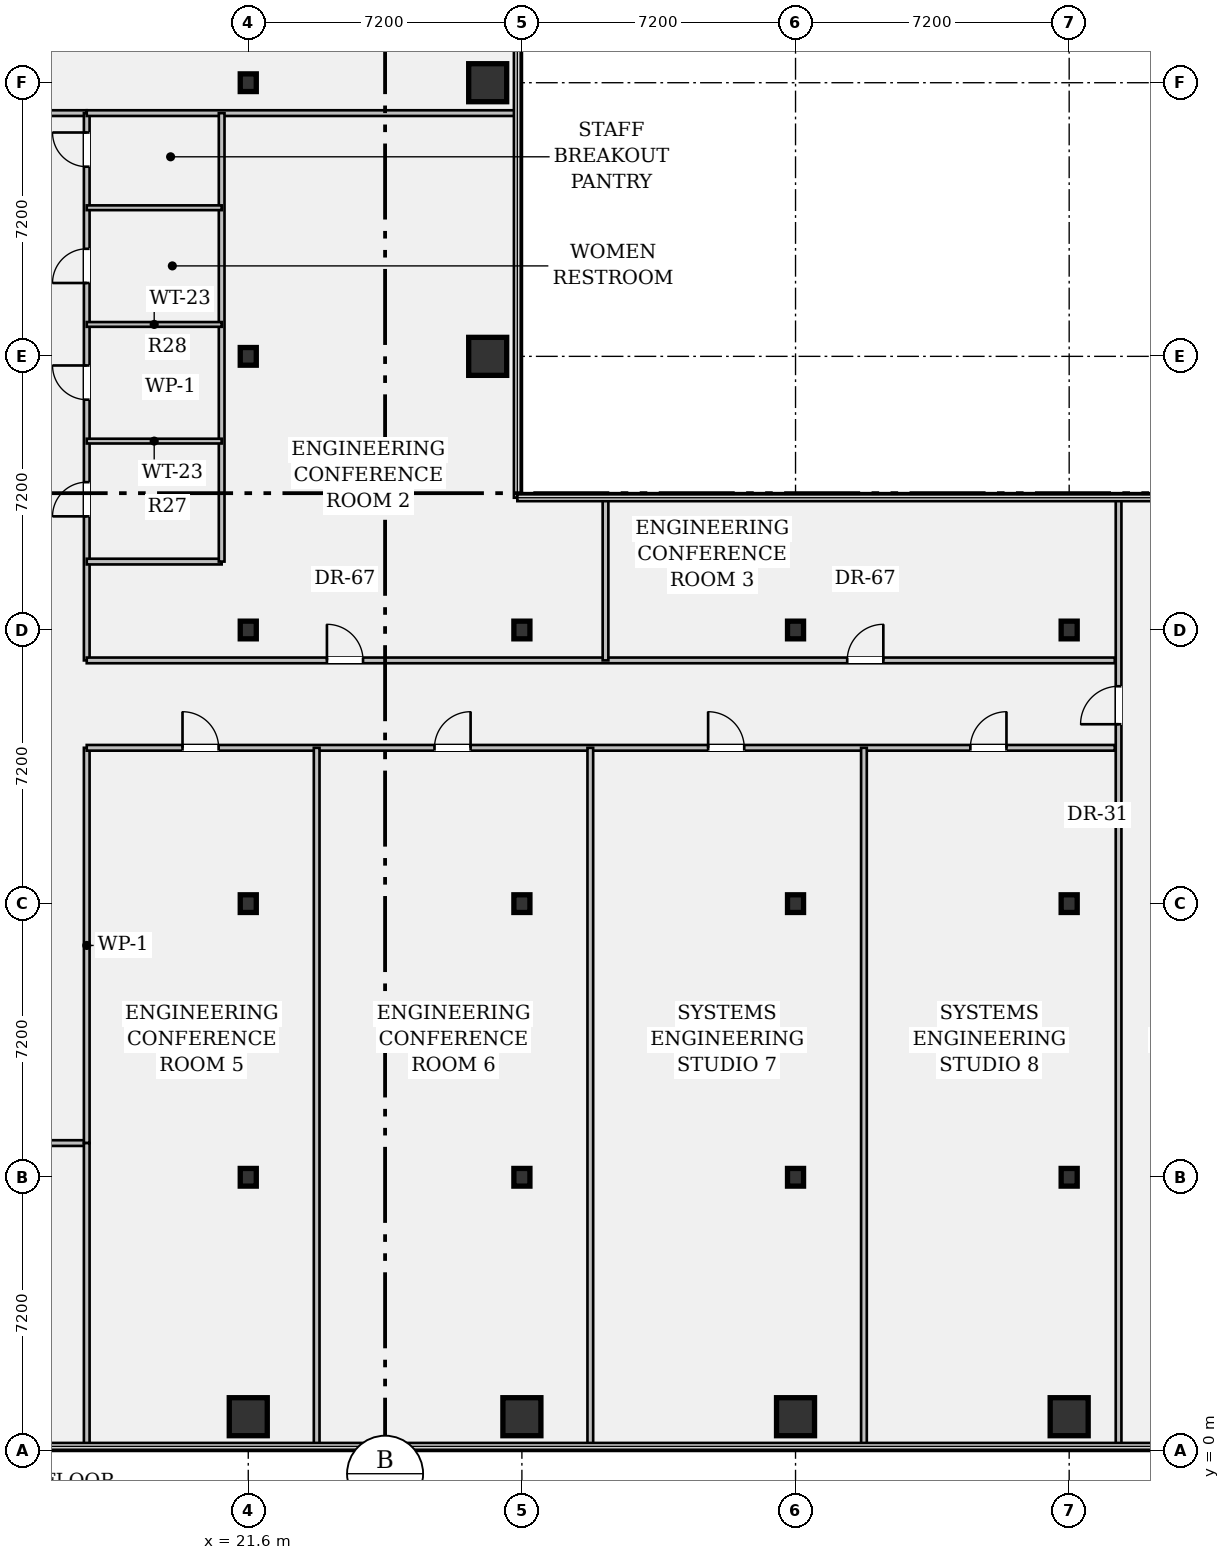
"""IFC4 building model, lengths in metres.
Left out: names, types, materials, properties, quantities, classifications, styles, units other than length and angle.
Written with IfcOpenShell. Run it as: python <this file> out.ifc"""

import sys

from ifc_helpers import new_model, si_unit, direction, frame, frame_2d, origin, origin_2d, place, context, subcontext, project, spatial, rectangle, hollow_rectangle, i_section, extrude, element, fill, save


model = new_model("IFC4")
c1 = context("Model", 3, precision=1e-05, world=origin(), true_north=direction((0.0, 1.0)))
c2 = subcontext(c1, "Body", "Model", "MODEL_VIEW")
j1 = project(units=[si_unit("LENGTHUNIT", "METRE"), si_unit("PLANEANGLEUNIT", "RADIAN")], contexts=[c1])
p1 = place(None, origin())
s1 = spatial("IfcSite", under=j1, at=p1, CompositionType="ELEMENT")
p2 = place(p1, origin())
s2 = spatial("IfcBuilding", under=s1, at=p2, CompositionType="ELEMENT")
p3 = place(p2, frame((0.0, 0.0, 50.4)))
s3 = spatial("IfcBuildingStorey", under=s2, at=p3, CompositionType="ELEMENT", Elevation=50.4)
p4 = place(p3, frame((21.6, 0.9, 0.0), z_axis=(0.0, 0.0, 1.0), x_axis=(1.0, 0.0, 0.0)))
e1 = element("IfcColumn", 1, at=p4, inside=s3, PredefinedType="COLUMN", context=c2, shape_type="SweptSolid", body=[
    extrude(hollow_rectangle(XDim=1.0, YDim=1.0, WallThickness=0.065, at=origin_2d()), origin(), (0.0, 0.0, 1.0), 3.57),
])
for number, where, z_axis, x_axis in (
    (2, (21.6, 7.2, 0.0), (0.0, 0.0, 1.0), (1.0, 0.0, 0.0)),
    (3, (21.6, 14.4, 0.0), (0.0, 0.0, 1.0), (1.0, 0.0, 0.0)),
    (4, (21.6, 21.6, 0.0), (0.0, 0.0, 1.0), (1.0, 0.0, 0.0)),
    (5, (21.6, 28.8, 0.0), (0.0, 0.0, 1.0), (1.0, 0.0, 0.0)),
    (6, (21.6, 36.0, 0.0), (0.0, 0.0, 1.0), (1.0, 0.0, 0.0)),
):
    element("IfcColumn", number, at=place(p3, frame(where, z_axis=z_axis, x_axis=x_axis)), inside=s3, PredefinedType="COLUMN", context=c2, shape_type="SweptSolid", body=[
        extrude(i_section(OverallWidth=0.422, OverallDepth=0.465, WebThickness=0.045, FlangeThickness=0.073, FilletRadius=0.018, at=origin_2d()), origin(), (0.0, 0.0, 1.0), 3.57),
    ])
for number, where, z_axis, x_axis in (
    (7, (27.9, 28.8, 0.0), (0.0, 0.0, 1.0), (1.0, 0.0, 0.0)),
    (8, (27.9, 36.0, 0.0), (0.0, 0.0, 1.0), (1.0, 0.0, 0.0)),
    (9, (28.8, 0.9, 0.0), (0.0, 0.0, 1.0), (1.0, 0.0, 0.0)),
):
    element("IfcColumn", number, at=place(p3, frame(where, z_axis=z_axis, x_axis=x_axis)), inside=s3, PredefinedType="COLUMN", context=c2, shape_type="SweptSolid", body=[
        extrude(hollow_rectangle(XDim=1.0, YDim=1.0, WallThickness=0.065, at=origin_2d()), origin(), (0.0, 0.0, 1.0), 3.57),
    ])
for number, where, z_axis, x_axis in (
    (10, (28.8, 7.2, 0.0), (0.0, 0.0, 1.0), (1.0, 0.0, 0.0)),
    (11, (28.8, 14.4, 0.0), (0.0, 0.0, 1.0), (1.0, 0.0, 0.0)),
    (12, (28.8, 21.6, 0.0), (0.0, 0.0, 1.0), (1.0, 0.0, 0.0)),
):
    element("IfcColumn", number, at=place(p3, frame(where, z_axis=z_axis, x_axis=x_axis)), inside=s3, PredefinedType="COLUMN", context=c2, shape_type="SweptSolid", body=[
        extrude(i_section(OverallWidth=0.422, OverallDepth=0.465, WebThickness=0.045, FlangeThickness=0.073, FilletRadius=0.018, at=origin_2d()), origin(), (0.0, 0.0, 1.0), 3.57),
    ])
p5 = place(p3, frame((36.0, 0.9, 0.0), z_axis=(0.0, 0.0, 1.0), x_axis=(1.0, 0.0, 0.0)))
e13 = element("IfcColumn", 13, at=p5, inside=s3, PredefinedType="COLUMN", context=c2, shape_type="SweptSolid", body=[
    extrude(hollow_rectangle(XDim=1.0, YDim=1.0, WallThickness=0.065, at=origin_2d()), origin(), (0.0, 0.0, 1.0), 3.57),
])
for number, where, z_axis, x_axis in (
    (14, (36.0, 7.2, 0.0), (0.0, 0.0, 1.0), (1.0, 0.0, 0.0)),
    (15, (36.0, 14.4, 0.0), (0.0, 0.0, 1.0), (1.0, 0.0, 0.0)),
    (16, (36.0, 21.6, 0.0), (0.0, 0.0, 1.0), (1.0, 0.0, 0.0)),
):
    element("IfcColumn", number, at=place(p3, frame(where, z_axis=z_axis, x_axis=x_axis)), inside=s3, PredefinedType="COLUMN", context=c2, shape_type="SweptSolid", body=[
        extrude(i_section(OverallWidth=0.422, OverallDepth=0.465, WebThickness=0.045, FlangeThickness=0.073, FilletRadius=0.018, at=origin_2d()), origin(), (0.0, 0.0, 1.0), 3.57),
    ])
p6 = place(p3, frame((43.2, 0.9, 0.0), z_axis=(0.0, 0.0, 1.0), x_axis=(1.0, 0.0, 0.0)))
e17 = element("IfcColumn", 17, at=p6, inside=s3, PredefinedType="COLUMN", context=c2, shape_type="SweptSolid", body=[
    extrude(hollow_rectangle(XDim=1.0, YDim=1.0, WallThickness=0.065, at=origin_2d()), origin(), (0.0, 0.0, 1.0), 3.57),
])
for number, where, z_axis, x_axis in (
    (18, (43.2, 7.2, 0.0), (0.0, 0.0, 1.0), (1.0, 0.0, 0.0)),
    (19, (43.2, 14.4, 0.0), (0.0, 0.0, 1.0), (1.0, 0.0, 0.0)),
    (20, (43.2, 21.6, 0.0), (0.0, 0.0, 1.0), (1.0, 0.0, 0.0)),
):
    element("IfcColumn", number, at=place(p3, frame(where, z_axis=z_axis, x_axis=x_axis)), inside=s3, PredefinedType="COLUMN", context=c2, shape_type="SweptSolid", body=[
        extrude(i_section(OverallWidth=0.422, OverallDepth=0.465, WebThickness=0.045, FlangeThickness=0.073, FilletRadius=0.018, at=origin_2d()), origin(), (0.0, 0.0, 1.0), 3.57),
    ])
p7 = place(p3, frame((14.4, 8.1, 0.0), z_axis=(0.0, 0.0, 1.0), x_axis=(1.0, 0.0, 0.0)))
e21 = element("IfcWall", 21, at=p7, inside=s3, PredefinedType="PARTITIONING", context=c2, shape_type="SweptSolid", body=[
    extrude(rectangle(XDim=2.95, YDim=0.15, at=frame_2d((1.475, 0.0))), origin(), (0.0, 0.0, 1.0), 3.088),
])
p8 = place(p7, frame((0.95, 0.0, 0.0)))
e22 = element("IfcOpeningElement", 22, at=p8, cuts=e21, PredefinedType="OPENING", context=c2, shape_type="SweptSolid", body=[
    extrude(rectangle(XDim=0.95, YDim=2.15, at=frame_2d((0.475, 1.075))), frame((0.0, 0.087, 0.0), z_axis=(0.0, -1.0, 0.0), x_axis=(1.0, 0.0, 0.0)), (0.0, 0.0, 1.0), 0.174),
])
p9 = place(p3, frame((14.4, 35.2, 0.0), z_axis=(0.0, 0.0, 1.0), x_axis=(1.0, 0.0, 0.0)))
e23 = element("IfcWall", 23, at=p9, inside=s3, PredefinedType="PARTITIONING", context=c2, shape_type="SweptSolid", body=[
    extrude(rectangle(XDim=2.95, YDim=0.15, at=frame_2d((1.475, 0.0))), origin(), (0.0, 0.0, 1.0), 3.088),
])
p10 = place(p9, frame((0.95, 0.0, 0.0)))
e24 = element("IfcOpeningElement", 24, at=p10, cuts=e23, PredefinedType="OPENING", context=c2, shape_type="SweptSolid", body=[
    extrude(rectangle(XDim=1.0, YDim=2.15, at=frame_2d((0.5, 1.075))), frame((0.0, 0.087, 0.0), z_axis=(0.0, -1.0, 0.0), x_axis=(1.0, 0.0, 0.0)), (0.0, 0.0, 1.0), 0.174),
])
p11 = place(p3, frame((17.35, 8.1, 0.0), z_axis=(0.0, 0.0, 1.0), x_axis=(0.0, 1.0, 0.0)))
e25 = element("IfcWall", 25, at=p11, inside=s3, PredefinedType="PARTITIONING", context=c2, shape_type="SweptSolid", body=[
    extrude(rectangle(XDim=10.4, YDim=0.15, at=frame_2d((5.2, 0.0))), origin(), (0.0, 0.0, 1.0), 2.699),
])
p12 = place(p3, frame((17.35, 20.8, 0.0), z_axis=(0.0, 0.0, 1.0), x_axis=(0.0, 1.0, 0.0)))
e26 = element("IfcWall", 26, at=p12, inside=s3, PredefinedType="PARTITIONING", context=c2, shape_type="SweptSolid", body=[
    extrude(rectangle(XDim=14.4, YDim=0.15, at=frame_2d((7.2, 0.0))), origin(), (0.0, 0.0, 1.0), 2.699),
])
p13 = place(p12, frame((3.79, 0.0, 0.0)))
e27 = element("IfcOpeningElement", 27, at=p13, cuts=e26, PredefinedType="OPENING", context=c2, shape_type="SweptSolid", body=[
    extrude(rectangle(XDim=0.9, YDim=2.15, at=frame_2d((0.45, 1.075))), frame((0.0, 0.087, 0.0), z_axis=(0.0, -1.0, 0.0), x_axis=(1.0, 0.0, 0.0)), (0.0, 0.0, 1.0), 0.174),
])
p14 = place(p12, frame((6.86, 0.0, 0.0)))
e28 = element("IfcOpeningElement", 28, at=p14, cuts=e26, PredefinedType="OPENING", context=c2, shape_type="SweptSolid", body=[
    extrude(rectangle(XDim=0.9, YDim=2.15, at=frame_2d((0.45, 1.075))), frame((0.0, 0.087, 0.0), z_axis=(0.0, -1.0, 0.0), x_axis=(1.0, 0.0, 0.0)), (0.0, 0.0, 1.0), 0.174),
])
p15 = place(p12, frame((9.93, 0.0, 0.0)))
e29 = element("IfcOpeningElement", 29, at=p15, cuts=e26, PredefinedType="OPENING", context=c2, shape_type="SweptSolid", body=[
    extrude(rectangle(XDim=0.9, YDim=2.15, at=frame_2d((0.45, 1.075))), frame((0.0, 0.087, 0.0), z_axis=(0.0, -1.0, 0.0), x_axis=(1.0, 0.0, 0.0)), (0.0, 0.0, 1.0), 0.174),
])
p16 = place(p12, frame((12.99, 0.0, 0.0)))
e30 = element("IfcOpeningElement", 30, at=p16, cuts=e26, PredefinedType="OPENING", context=c2, shape_type="SweptSolid", body=[
    extrude(rectangle(XDim=0.9, YDim=2.15, at=frame_2d((0.45, 1.075))), frame((0.0, 0.087, 0.0), z_axis=(0.0, -1.0, 0.0), x_axis=(1.0, 0.0, 0.0)), (0.0, 0.0, 1.0), 0.174),
])
p17 = place(p3, frame((17.35, 18.5, 0.0), z_axis=(0.0, 0.0, 1.0), x_axis=(1.0, 0.0, 0.0)))
e31 = element("IfcWall", 31, at=p17, inside=s3, PredefinedType="PARTITIONING", context=c2, shape_type="SweptSolid", body=[
    extrude(rectangle(XDim=27.05, YDim=0.15, at=frame_2d((13.525, 0.0))), origin(), (0.0, 0.0, 1.0), 2.699),
])
p18 = place(p17, frame((2.52, 0.0, 0.0)))
e32 = element("IfcOpeningElement", 32, at=p18, cuts=e31, PredefinedType="OPENING", context=c2, shape_type="SweptSolid", body=[
    extrude(rectangle(XDim=0.95, YDim=2.15, at=frame_2d((0.475, 1.075))), frame((0.0, 0.087, 0.0), z_axis=(0.0, -1.0, 0.0), x_axis=(1.0, 0.0, 0.0)), (0.0, 0.0, 1.0), 0.174),
])
p19 = place(p17, frame((9.15, 0.0, 0.0)))
e33 = element("IfcOpeningElement", 33, at=p19, cuts=e31, PredefinedType="OPENING", context=c2, shape_type="SweptSolid", body=[
    extrude(rectangle(XDim=0.95, YDim=2.15, at=frame_2d((0.475, 1.075))), frame((0.0, 0.087, 0.0), z_axis=(0.0, -1.0, 0.0), x_axis=(1.0, 0.0, 0.0)), (0.0, 0.0, 1.0), 0.174),
])
p20 = place(p17, frame((16.35, 0.0, 0.0)))
e34 = element("IfcOpeningElement", 34, at=p20, cuts=e31, PredefinedType="OPENING", context=c2, shape_type="SweptSolid", body=[
    extrude(rectangle(XDim=0.95, YDim=2.15, at=frame_2d((0.475, 1.075))), frame((0.0, 0.087, 0.0), z_axis=(0.0, -1.0, 0.0), x_axis=(1.0, 0.0, 0.0)), (0.0, 0.0, 1.0), 0.174),
])
p21 = place(p17, frame((23.25, 0.0, 0.0)))
e35 = element("IfcOpeningElement", 35, at=p21, cuts=e31, PredefinedType="OPENING", context=c2, shape_type="SweptSolid", body=[
    extrude(rectangle(XDim=0.95, YDim=2.15, at=frame_2d((0.475, 1.075))), frame((0.0, 0.087, 0.0), z_axis=(0.0, -1.0, 0.0), x_axis=(1.0, 0.0, 0.0)), (0.0, 0.0, 1.0), 0.174),
])
p22 = place(p3, frame((17.35, 20.8, 0.0), z_axis=(0.0, 0.0, 1.0), x_axis=(1.0, 0.0, 0.0)))
e36 = element("IfcWall", 36, at=p22, inside=s3, PredefinedType="PARTITIONING", context=c2, shape_type="SweptSolid", body=[
    extrude(rectangle(XDim=27.05, YDim=0.15, at=frame_2d((13.525, 0.0))), origin(), (0.0, 0.0, 1.0), 2.699),
])
p23 = place(p22, frame((6.32, 0.0, 0.0)))
e37 = element("IfcOpeningElement", 37, at=p23, cuts=e36, PredefinedType="OPENING", context=c2, shape_type="SweptSolid", body=[
    extrude(rectangle(XDim=0.95, YDim=2.15, at=frame_2d((0.475, 1.075))), frame((0.0, 0.087, 0.0), z_axis=(0.0, -1.0, 0.0), x_axis=(1.0, 0.0, 0.0)), (0.0, 0.0, 1.0), 0.174),
])
p24 = place(p22, frame((20.01, 0.0, 0.0)))
e38 = element("IfcOpeningElement", 38, at=p24, cuts=e36, PredefinedType="OPENING", context=c2, shape_type="SweptSolid", body=[
    extrude(rectangle(XDim=0.95, YDim=2.15, at=frame_2d((0.475, 1.075))), frame((0.0, 0.087, 0.0), z_axis=(0.0, -1.0, 0.0), x_axis=(1.0, 0.0, 0.0)), (0.0, 0.0, 1.0), 0.174),
])
p25 = place(p3, frame((44.5, 0.12, 0.0), z_axis=(0.0, 0.0, 1.0), x_axis=(0.0, 1.0, 0.0)))
e39 = element("IfcWall", 39, at=p25, inside=s3, PredefinedType="PARTITIONING", context=c2, shape_type="SweptSolid", body=[
    extrude(rectangle(XDim=24.96, YDim=0.15, at=frame_2d((12.48, 0.0))), origin(), (0.0, 0.0, 1.0), 2.699),
])
p26 = place(p25, frame((19.0, 0.0, 0.0)))
e40 = element("IfcOpeningElement", 40, at=p26, cuts=e39, PredefinedType="OPENING", context=c2, shape_type="SweptSolid", body=[
    extrude(rectangle(XDim=1.0, YDim=2.15, at=frame_2d((0.5, 1.075))), frame((0.0, 0.087, 0.0), z_axis=(0.0, -1.0, 0.0), x_axis=(1.0, 0.0, 0.0)), (0.0, 0.0, 1.0), 0.174),
])
p27 = place(p3, frame((17.35, 35.2, 0.0), z_axis=(0.0, 0.0, 1.0), x_axis=(1.0, 0.0, 0.0)))
e41 = element("IfcWall", 41, at=p27, inside=s3, PredefinedType="PARTITIONING", context=c2, shape_type="SweptSolid", body=[
    extrude(rectangle(XDim=11.33, YDim=0.15, at=frame_2d((5.665, 0.0))), origin(), (0.0, 0.0, 1.0), 2.699),
])
p28 = place(p3, frame((17.35, 23.4, 0.0), z_axis=(0.0, 0.0, 1.0), x_axis=(1.0, 0.0, 0.0)))
e42 = element("IfcWall", 42, at=p28, inside=s3, PredefinedType="PARTITIONING", context=c2, shape_type="SweptSolid", body=[
    extrude(rectangle(XDim=3.55, YDim=0.15, at=frame_2d((1.775, 0.0))), origin(), (0.0, 0.0, 1.0), 3.088),
])
p29 = place(p3, frame((20.9, 23.4, 0.0), z_axis=(0.0, 0.0, 1.0), x_axis=(0.0, 1.0, 0.0)))
e43 = element("IfcWall", 43, at=p29, inside=s3, PredefinedType="PARTITIONING", context=c2, shape_type="SweptSolid", body=[
    extrude(rectangle(XDim=11.8, YDim=0.15, at=frame_2d((5.9, 0.0))), origin(), (0.0, 0.0, 1.0), 2.699),
])
for number, where, z_axis, x_axis in (
    (44, (17.35, 26.57, 0.0), (0.0, 0.0, 1.0), (1.0, 0.0, 0.0)),
    (45, (17.35, 29.64, 0.0), (0.0, 0.0, 1.0), (1.0, 0.0, 0.0)),
    (46, (17.35, 32.71, 0.0), (0.0, 0.0, 1.0), (1.0, 0.0, 0.0)),
):
    element("IfcWall", number, at=place(p3, frame(where, z_axis=z_axis, x_axis=x_axis)), inside=s3, PredefinedType="PARTITIONING", context=c2, shape_type="SweptSolid", body=[
        extrude(rectangle(XDim=3.55, YDim=0.125, at=frame_2d((1.775, 0.0))), origin(), (0.0, 0.0, 1.0), 3.088),
    ])
p30 = place(p3, frame((31.0, 20.8, 0.0), z_axis=(0.0, 0.0, 1.0), x_axis=(0.0, 1.0, 0.0)))
e47 = element("IfcWall", 47, at=p30, inside=s3, PredefinedType="PARTITIONING", context=c2, shape_type="SweptSolid", body=[
    extrude(rectangle(XDim=4.25, YDim=0.15, at=frame_2d((2.125, 0.0))), origin(), (0.0, 0.0, 1.0), 2.699),
])
p31 = place(p3, frame((17.35, 0.12, 0.0), z_axis=(0.0, 0.0, 1.0), x_axis=(0.0, 1.0, 0.0)))
e48 = element("IfcWall", 48, at=p31, inside=s3, PredefinedType="PARTITIONING", context=c2, shape_type="SweptSolid", body=[
    extrude(rectangle(XDim=7.98, YDim=0.15, at=frame_2d((3.99, 0.0))), origin(), (0.0, 0.0, 1.0), 2.699),
])
for number, where, z_axis, x_axis in (
    (49, (23.4, 0.12, 0.0), (0.0, 0.0, 1.0), (0.0, 1.0, 0.0)),
    (50, (30.6, 0.12, 0.0), (0.0, 0.0, 1.0), (0.0, 1.0, 0.0)),
    (51, (37.8, 0.12, 0.0), (0.0, 0.0, 1.0), (0.0, 1.0, 0.0)),
):
    element("IfcWall", number, at=place(p3, frame(where, z_axis=z_axis, x_axis=x_axis)), inside=s3, PredefinedType="PARTITIONING", context=c2, shape_type="SweptSolid", body=[
        extrude(rectangle(XDim=18.38, YDim=0.15, at=frame_2d((9.19, 0.0))), origin(), (0.0, 0.0, 1.0), 2.699),
    ])
p32 = place(p13, origin())
e52 = element("IfcDoor", 52, at=p32, inside=s3, OperationType="SINGLE_SWING_LEFT", PredefinedType="DOOR", context=c2, shape_type="SweptSolid", body=[
    extrude(rectangle(XDim=0.9, YDim=2.15, at=frame_2d((0.45, 1.075))), frame((0.0, 0.025, 0.0), z_axis=(0.0, -1.0, 0.0), x_axis=(1.0, 0.0, 0.0)), (0.0, 0.0, 1.0), 0.05),
])
fill(e27, e52)
p33 = place(p14, origin())
e53 = element("IfcDoor", 53, at=p33, inside=s3, OperationType="SINGLE_SWING_RIGHT", PredefinedType="DOOR", context=c2, shape_type="SweptSolid", body=[
    extrude(rectangle(XDim=0.9, YDim=2.15, at=frame_2d((0.45, 1.075))), frame((0.0, 0.025, 0.0), z_axis=(0.0, -1.0, 0.0), x_axis=(1.0, 0.0, 0.0)), (0.0, 0.0, 1.0), 0.05),
])
fill(e28, e53)
p34 = place(p15, origin())
e54 = element("IfcDoor", 54, at=p34, inside=s3, OperationType="SINGLE_SWING_LEFT", PredefinedType="DOOR", context=c2, shape_type="SweptSolid", body=[
    extrude(rectangle(XDim=0.9, YDim=2.15, at=frame_2d((0.45, 1.075))), frame((0.0, 0.025, 0.0), z_axis=(0.0, -1.0, 0.0), x_axis=(1.0, 0.0, 0.0)), (0.0, 0.0, 1.0), 0.05),
])
fill(e29, e54)
p35 = place(p16, origin())
e55 = element("IfcDoor", 55, at=p35, inside=s3, OperationType="SINGLE_SWING_RIGHT", PredefinedType="DOOR", context=c2, shape_type="SweptSolid", body=[
    extrude(rectangle(XDim=0.9, YDim=2.15, at=frame_2d((0.45, 1.075))), frame((0.0, 0.025, 0.0), z_axis=(0.0, -1.0, 0.0), x_axis=(1.0, 0.0, 0.0)), (0.0, 0.0, 1.0), 0.05),
])
fill(e30, e55)
p36 = place(p23, origin())
e56 = element("IfcDoor", 56, at=p36, inside=s3, OperationType="SINGLE_SWING_LEFT", PredefinedType="DOOR", context=c2, shape_type="SweptSolid", body=[
    extrude(rectangle(XDim=0.95, YDim=2.15, at=frame_2d((0.475, 1.075))), frame((0.0, 0.025, 0.0), z_axis=(0.0, -1.0, 0.0), x_axis=(1.0, 0.0, 0.0)), (0.0, 0.0, 1.0), 0.05),
])
fill(e37, e56)
p37 = place(p24, origin())
e57 = element("IfcDoor", 57, at=p37, inside=s3, OperationType="SINGLE_SWING_RIGHT", PredefinedType="DOOR", context=c2, shape_type="SweptSolid", body=[
    extrude(rectangle(XDim=0.95, YDim=2.15, at=frame_2d((0.475, 1.075))), frame((0.0, 0.025, 0.0), z_axis=(0.0, -1.0, 0.0), x_axis=(1.0, 0.0, 0.0)), (0.0, 0.0, 1.0), 0.05),
])
fill(e38, e57)
p38 = place(p18, origin())
e58 = element("IfcDoor", 58, at=p38, inside=s3, OperationType="SINGLE_SWING_LEFT", PredefinedType="DOOR", context=c2, shape_type="SweptSolid", body=[
    extrude(rectangle(XDim=0.95, YDim=2.15, at=frame_2d((0.475, 1.075))), frame((0.0, 0.025, 0.0), z_axis=(0.0, -1.0, 0.0), x_axis=(1.0, 0.0, 0.0)), (0.0, 0.0, 1.0), 0.05),
])
fill(e32, e58)
p39 = place(p19, origin())
e59 = element("IfcDoor", 59, at=p39, inside=s3, OperationType="SINGLE_SWING_RIGHT", PredefinedType="DOOR", context=c2, shape_type="SweptSolid", body=[
    extrude(rectangle(XDim=0.95, YDim=2.15, at=frame_2d((0.475, 1.075))), frame((0.0, 0.025, 0.0), z_axis=(0.0, -1.0, 0.0), x_axis=(1.0, 0.0, 0.0)), (0.0, 0.0, 1.0), 0.05),
])
fill(e33, e59)
p40 = place(p20, origin())
e60 = element("IfcDoor", 60, at=p40, inside=s3, OperationType="SINGLE_SWING_LEFT", PredefinedType="DOOR", context=c2, shape_type="SweptSolid", body=[
    extrude(rectangle(XDim=0.95, YDim=2.15, at=frame_2d((0.475, 1.075))), frame((0.0, 0.025, 0.0), z_axis=(0.0, -1.0, 0.0), x_axis=(1.0, 0.0, 0.0)), (0.0, 0.0, 1.0), 0.05),
])
fill(e34, e60)
p41 = place(p21, origin())
e61 = element("IfcDoor", 61, at=p41, inside=s3, OperationType="SINGLE_SWING_RIGHT", PredefinedType="DOOR", context=c2, shape_type="SweptSolid", body=[
    extrude(rectangle(XDim=0.95, YDim=2.15, at=frame_2d((0.475, 1.075))), frame((0.0, 0.025, 0.0), z_axis=(0.0, -1.0, 0.0), x_axis=(1.0, 0.0, 0.0)), (0.0, 0.0, 1.0), 0.05),
])
fill(e35, e61)
p42 = place(p26, origin())
e62 = element("IfcDoor", 62, at=p42, inside=s3, OperationType="SINGLE_SWING_LEFT", PredefinedType="DOOR", context=c2, shape_type="SweptSolid", body=[
    extrude(rectangle(XDim=1.0, YDim=2.15, at=frame_2d((0.5, 1.075))), frame((0.0, 0.025, 0.0), z_axis=(0.0, -1.0, 0.0), x_axis=(1.0, 0.0, 0.0)), (0.0, 0.0, 1.0), 0.05),
])
fill(e40, e62)
save(model, sys.argv[1])
